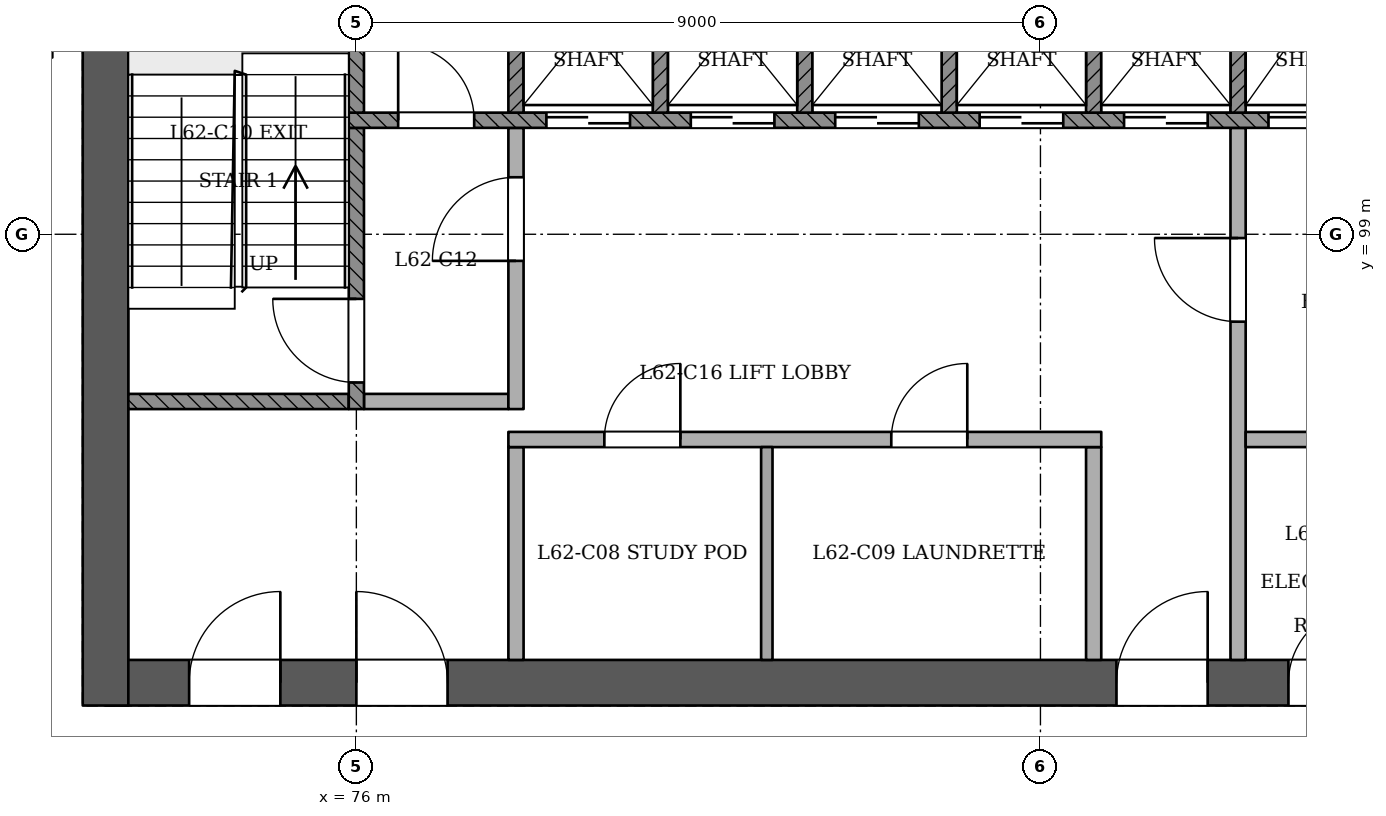
"""IFC4 building model, lengths in metres.
Left out: names, types, materials, properties, quantities, classifications, styles, units other than length and angle.
Written with IfcOpenShell. Run it as: python <this file> out.ifc"""

import sys

from ifc_helpers import new_model, si_unit, direction, frame, frame_2d, origin, place, context, subcontext, project, spatial, rectangle, extrude, element, fill, save


model = new_model("IFC4")
c1 = context("Model", 3, precision=1e-05, world=origin(), true_north=direction((0.0, 1.0)))
c2 = subcontext(c1, "Body", "Model", "MODEL_VIEW")
j1 = project(units=[si_unit("LENGTHUNIT", "METRE"), si_unit("PLANEANGLEUNIT", "RADIAN")], contexts=[c1])
p1 = place(None, origin())
s1 = spatial("IfcSite", under=j1, at=p1, CompositionType="ELEMENT")
p2 = place(p1, origin())
s2 = spatial("IfcBuilding", under=s1, at=p2, CompositionType="ELEMENT")
p3 = place(p2, frame((0.0, 0.0, 242.8)))
s3 = spatial("IfcBuildingStorey", under=s2, at=p3, CompositionType="ELEMENT", Elevation=242.8)
p4 = place(p3, frame((72.7, 93.1, 0.0), z_axis=(0.0, 0.0, 1.0), x_axis=(1.0, 0.0, 0.0)))
e1 = element("IfcWall", 1, at=p4, inside=s3, PredefinedType="SHEAR", context=c2, shape_type="SweptSolid", body=[
    extrude(rectangle(XDim=24.9, YDim=0.6, at=frame_2d((12.45, 0.0))), origin(), (0.0, 0.0, 1.0), 3.6),
])
p5 = place(p4, frame((1.1, 0.0, 0.0)))
e2 = element("IfcOpeningElement", 2, at=p5, cuts=e1, PredefinedType="OPENING", context=c2, shape_type="SweptSolid", body=[
    extrude(rectangle(XDim=1.2, YDim=2.1, at=frame_2d((0.6, 1.05))), frame((0.0, 0.311, 0.0), z_axis=(0.0, -1.0, 0.0), x_axis=(1.0, 0.0, 0.0)), (0.0, 0.0, 1.0), 0.621),
])
p6 = place(p4, frame((3.3, 0.0, 0.0)))
e3 = element("IfcOpeningElement", 3, at=p6, cuts=e1, PredefinedType="OPENING", context=c2, shape_type="SweptSolid", body=[
    extrude(rectangle(XDim=1.2, YDim=2.1, at=frame_2d((0.6, 1.05))), frame((0.0, 0.311, 0.0), z_axis=(0.0, -1.0, 0.0), x_axis=(1.0, 0.0, 0.0)), (0.0, 0.0, 1.0), 0.621),
])
p7 = place(p4, frame((13.3, 0.0, 0.0)))
e4 = element("IfcOpeningElement", 4, at=p7, cuts=e1, PredefinedType="OPENING", context=c2, shape_type="SweptSolid", body=[
    extrude(rectangle(XDim=1.2, YDim=2.1, at=frame_2d((0.6, 1.05))), frame((0.0, 0.311, 0.0), z_axis=(0.0, -1.0, 0.0), x_axis=(1.0, 0.0, 0.0)), (0.0, 0.0, 1.0), 0.621),
])
p8 = place(p4, frame((15.562, 0.0, 0.0)))
e5 = element("IfcOpeningElement", 5, at=p8, cuts=e1, PredefinedType="OPENING", context=c2, shape_type="SweptSolid", body=[
    extrude(rectangle(XDim=1.0, YDim=2.1, at=frame_2d((0.5, 1.05))), frame((0.0, 0.311, 0.0), z_axis=(0.0, -1.0, 0.0), x_axis=(1.0, 0.0, 0.0)), (0.0, 0.0, 1.0), 0.621),
])
p9 = place(p4, frame((18.2, 0.0, 0.0)))
e6 = element("IfcOpeningElement", 6, at=p9, cuts=e1, PredefinedType="OPENING", context=c2, shape_type="SweptSolid", body=[
    extrude(rectangle(XDim=1.0, YDim=2.1, at=frame_2d((0.5, 1.05))), frame((0.0, 0.311, 0.0), z_axis=(0.0, -1.0, 0.0), x_axis=(1.0, 0.0, 0.0)), (0.0, 0.0, 1.0), 0.621),
])
p10 = place(p4, frame((21.788, 0.0, 0.0)))
e7 = element("IfcOpeningElement", 7, at=p10, cuts=e1, PredefinedType="OPENING", context=c2, shape_type="SweptSolid", body=[
    extrude(rectangle(XDim=1.0, YDim=2.1, at=frame_2d((0.5, 1.05))), frame((0.0, 0.311, 0.0), z_axis=(0.0, -1.0, 0.0), x_axis=(1.0, 0.0, 0.0)), (0.0, 0.0, 1.0), 0.621),
])
p11 = place(p3, frame((72.7, 103.7, 0.0), z_axis=(0.0, 0.0, 1.0), x_axis=(0.0, -1.0, 0.0)))
e8 = element("IfcWall", 8, at=p11, inside=s3, PredefinedType="SHEAR", context=c2, shape_type="SweptSolid", body=[
    extrude(rectangle(XDim=10.9, YDim=0.6, at=frame_2d((5.45, 0.0))), origin(), (0.0, 0.0, 1.0), 3.6),
])
p12 = place(p3, frame((72.0, 101.4, 0.0), z_axis=(0.0, 0.0, 1.0), x_axis=(-1.0, 0.0, 0.0)))
e9 = element("IfcWall", 9, at=p12, inside=s3, PredefinedType="PARTITIONING", context=c2, shape_type="SweptSolid", body=[
    extrude(rectangle(XDim=1.8, YDim=0.15, at=frame_2d((0.9, 0.0))), origin(), (0.0, 0.0, 1.0), 3.2),
])
p13 = place(p12, frame((0.566, 0.0, 0.0)))
e10 = element("IfcOpeningElement", 10, at=p13, cuts=e9, PredefinedType="OPENING", context=c2, shape_type="SweptSolid", body=[
    extrude(rectangle(XDim=1.0, YDim=2.1, at=frame_2d((0.5, 1.05))), frame((0.0, 0.085, 0.0), z_axis=(0.0, -1.0, 0.0), x_axis=(1.0, 0.0, 0.0)), (0.0, 0.0, 1.0), 0.171),
])
p14 = place(p3, frame((78.1, 93.4, 0.0), z_axis=(0.0, 0.0, 1.0), x_axis=(0.0, 1.0, 0.0)))
e11 = element("IfcWall", 11, at=p14, inside=s3, PredefinedType="PARTITIONING", context=c2, shape_type="SweptSolid", body=[
    extrude(rectangle(XDim=2.8, YDim=0.2, at=frame_2d((1.4, 0.0))), origin(), (0.0, 0.0, 1.0), 3.2),
])
p15 = place(p3, frame((81.4, 93.4, 0.0), z_axis=(0.0, 0.0, 1.0), x_axis=(0.0, 1.0, 0.0)))
e12 = element("IfcWall", 12, at=p15, inside=s3, PredefinedType="PARTITIONING", context=c2, shape_type="SweptSolid", body=[
    extrude(rectangle(XDim=2.8, YDim=0.15, at=frame_2d((1.4, 0.0))), origin(), (0.0, 0.0, 1.0), 3.2),
])
p16 = place(p3, frame((85.7, 93.4, 0.0), z_axis=(0.0, 0.0, 1.0), x_axis=(0.0, 1.0, 0.0)))
e13 = element("IfcWall", 13, at=p16, inside=s3, PredefinedType="PARTITIONING", context=c2, shape_type="SweptSolid", body=[
    extrude(rectangle(XDim=2.8, YDim=0.2, at=frame_2d((1.4, 0.0))), origin(), (0.0, 0.0, 1.0), 3.2),
])
p17 = place(p3, frame((87.6, 93.4, 0.0), z_axis=(0.0, 0.0, 1.0), x_axis=(0.0, 1.0, 0.0)))
e14 = element("IfcWall", 14, at=p17, inside=s3, PredefinedType="PARTITIONING", context=c2, shape_type="SweptSolid", body=[
    extrude(rectangle(XDim=7.0, YDim=0.2, at=frame_2d((3.5, 0.0))), origin(), (0.0, 0.0, 1.0), 3.2),
])
p18 = place(p17, frame((4.45, 0.0, 0.0)))
e15 = element("IfcOpeningElement", 15, at=p18, cuts=e14, PredefinedType="OPENING", context=c2, shape_type="SweptSolid", body=[
    extrude(rectangle(XDim=1.1, YDim=2.1, at=frame_2d((0.55, 1.05))), frame((0.0, 0.11, 0.0), z_axis=(0.0, -1.0, 0.0), x_axis=(1.0, 0.0, 0.0)), (0.0, 0.0, 1.0), 0.221),
])
p19 = place(p3, frame((78.0, 96.3, 0.0), z_axis=(0.0, 0.0, 1.0), x_axis=(1.0, 0.0, 0.0)))
e16 = element("IfcWall", 16, at=p19, inside=s3, PredefinedType="PARTITIONING", context=c2, shape_type="SweptSolid", body=[
    extrude(rectangle(XDim=7.8, YDim=0.2, at=frame_2d((3.9, 0.0))), origin(), (0.0, 0.0, 1.0), 3.2),
])
p20 = place(p19, frame((1.262, 0.0, 0.0)))
e17 = element("IfcOpeningElement", 17, at=p20, cuts=e16, PredefinedType="OPENING", context=c2, shape_type="SweptSolid", body=[
    extrude(rectangle(XDim=1.0, YDim=2.1, at=frame_2d((0.5, 1.05))), frame((0.0, 0.11, 0.0), z_axis=(0.0, -1.0, 0.0), x_axis=(1.0, 0.0, 0.0)), (0.0, 0.0, 1.0), 0.221),
])
p21 = place(p19, frame((5.038, 0.0, 0.0)))
e18 = element("IfcOpeningElement", 18, at=p21, cuts=e16, PredefinedType="OPENING", context=c2, shape_type="SweptSolid", body=[
    extrude(rectangle(XDim=1.0, YDim=2.1, at=frame_2d((0.5, 1.05))), frame((0.0, 0.11, 0.0), z_axis=(0.0, -1.0, 0.0), x_axis=(1.0, 0.0, 0.0)), (0.0, 0.0, 1.0), 0.221),
])
p22 = place(p3, frame((87.7, 96.3, 0.0), z_axis=(0.0, 0.0, 1.0), x_axis=(1.0, 0.0, 0.0)))
e19 = element("IfcWall", 19, at=p22, inside=s3, PredefinedType="PARTITIONING", context=c2, shape_type="SweptSolid", body=[
    extrude(rectangle(XDim=3.6, YDim=0.2, at=frame_2d((1.8, 0.0))), origin(), (0.0, 0.0, 1.0), 3.2),
])
p23 = place(p3, frame((73.0, 96.8, 0.0), z_axis=(0.0, 0.0, 1.0), x_axis=(1.0, 0.0, 0.0)))
e20 = element("IfcWall", 20, at=p23, inside=s3, PredefinedType="SOLIDWALL", context=c2, shape_type="SweptSolid", body=[
    extrude(rectangle(XDim=2.9, YDim=0.2, at=frame_2d((1.45, 0.0))), origin(), (0.0, 0.0, 1.0), 3.2),
])
p24 = place(p3, frame((76.0, 96.7, 0.0), z_axis=(0.0, 0.0, 1.0), x_axis=(0.0, 1.0, 0.0)))
e21 = element("IfcWall", 21, at=p24, inside=s3, PredefinedType="SOLIDWALL", context=c2, shape_type="SweptSolid", body=[
    extrude(rectangle(XDim=3.7, YDim=0.2, at=frame_2d((1.85, 0.0))), origin(), (0.0, 0.0, 1.0), 3.2),
])
p25 = place(p24, frame((0.35, 0.0, 0.0)))
e22 = element("IfcOpeningElement", 22, at=p25, cuts=e21, PredefinedType="OPENING", context=c2, shape_type="SweptSolid", body=[
    extrude(rectangle(XDim=1.1, YDim=2.1, at=frame_2d((0.55, 1.05))), frame((0.0, 0.11, 0.0), z_axis=(0.0, -1.0, 0.0), x_axis=(1.0, 0.0, 0.0)), (0.0, 0.0, 1.0), 0.221),
])
p26 = place(p3, frame((76.1, 96.8, 0.0), z_axis=(0.0, 0.0, 1.0), x_axis=(1.0, 0.0, 0.0)))
e23 = element("IfcWall", 23, at=p26, inside=s3, PredefinedType="PARTITIONING", context=c2, shape_type="SweptSolid", body=[
    extrude(rectangle(XDim=1.9, YDim=0.2, at=frame_2d((0.95, 0.0))), origin(), (0.0, 0.0, 1.0), 3.2),
])
p27 = place(p3, frame((78.1, 96.7, 0.0), z_axis=(0.0, 0.0, 1.0), x_axis=(0.0, 1.0, 0.0)))
e24 = element("IfcWall", 24, at=p27, inside=s3, PredefinedType="PARTITIONING", context=c2, shape_type="SweptSolid", body=[
    extrude(rectangle(XDim=3.7, YDim=0.2, at=frame_2d((1.85, 0.0))), origin(), (0.0, 0.0, 1.0), 3.2),
])
p28 = place(p27, frame((1.95, 0.0, 0.0)))
e25 = element("IfcOpeningElement", 25, at=p28, cuts=e24, PredefinedType="OPENING", context=c2, shape_type="SweptSolid", body=[
    extrude(rectangle(XDim=1.1, YDim=2.1, at=frame_2d((0.55, 1.05))), frame((0.0, 0.11, 0.0), z_axis=(0.0, -1.0, 0.0), x_axis=(1.0, 0.0, 0.0)), (0.0, 0.0, 1.0), 0.221),
])
p29 = place(p3, frame((75.9, 100.5, 0.0), z_axis=(0.0, 0.0, 1.0), x_axis=(1.0, 0.0, 0.0)))
e26 = element("IfcWall", 26, at=p29, inside=s3, PredefinedType="SOLIDWALL", context=c2, shape_type="SweptSolid", body=[
    extrude(rectangle(XDim=18.2, YDim=0.2, at=frame_2d((9.1, 0.0))), origin(), (0.0, 0.0, 1.0), 3.2),
])
p30 = place(p29, frame((2.6, 0.0, 0.0)))
e27 = element("IfcOpeningElement", 27, at=p30, cuts=e26, PredefinedType="OPENING", context=c2, shape_type="SweptSolid", body=[
    extrude(rectangle(XDim=1.1, YDim=2.1, at=frame_2d((0.55, 1.05))), frame((0.0, 0.11, 0.0), z_axis=(0.0, -1.0, 0.0), x_axis=(1.0, 0.0, 0.0)), (0.0, 0.0, 1.0), 0.221),
])
p31 = place(p29, frame((4.5, 0.0, 0.0)))
e28 = element("IfcOpeningElement", 28, at=p31, cuts=e26, PredefinedType="OPENING", context=c2, shape_type="SweptSolid", body=[
    extrude(rectangle(XDim=1.1, YDim=2.1, at=frame_2d((0.55, 1.05))), frame((0.0, 0.11, 0.0), z_axis=(0.0, -1.0, 0.0), x_axis=(1.0, 0.0, 0.0)), (0.0, 0.0, 1.0), 0.221),
])
p32 = place(p29, frame((6.4, 0.0, 0.0)))
e29 = element("IfcOpeningElement", 29, at=p32, cuts=e26, PredefinedType="OPENING", context=c2, shape_type="SweptSolid", body=[
    extrude(rectangle(XDim=1.1, YDim=2.1, at=frame_2d((0.55, 1.05))), frame((0.0, 0.11, 0.0), z_axis=(0.0, -1.0, 0.0), x_axis=(1.0, 0.0, 0.0)), (0.0, 0.0, 1.0), 0.221),
])
p33 = place(p29, frame((8.3, 0.0, 0.0)))
e30 = element("IfcOpeningElement", 30, at=p33, cuts=e26, PredefinedType="OPENING", context=c2, shape_type="SweptSolid", body=[
    extrude(rectangle(XDim=1.1, YDim=2.1, at=frame_2d((0.55, 1.05))), frame((0.0, 0.11, 0.0), z_axis=(0.0, -1.0, 0.0), x_axis=(1.0, 0.0, 0.0)), (0.0, 0.0, 1.0), 0.221),
])
p34 = place(p29, frame((10.2, 0.0, 0.0)))
e31 = element("IfcOpeningElement", 31, at=p34, cuts=e26, PredefinedType="OPENING", context=c2, shape_type="SweptSolid", body=[
    extrude(rectangle(XDim=1.1, YDim=2.1, at=frame_2d((0.55, 1.05))), frame((0.0, 0.11, 0.0), z_axis=(0.0, -1.0, 0.0), x_axis=(1.0, 0.0, 0.0)), (0.0, 0.0, 1.0), 0.221),
])
p35 = place(p29, frame((12.1, 0.0, 0.0)))
e32 = element("IfcOpeningElement", 32, at=p35, cuts=e26, PredefinedType="OPENING", context=c2, shape_type="SweptSolid", body=[
    extrude(rectangle(XDim=1.1, YDim=2.1, at=frame_2d((0.55, 1.05))), frame((0.0, 0.11, 0.0), z_axis=(0.0, -1.0, 0.0), x_axis=(1.0, 0.0, 0.0)), (0.0, 0.0, 1.0), 0.221),
])
p36 = place(p29, frame((14.0, 0.0, 0.0)))
e33 = element("IfcOpeningElement", 33, at=p36, cuts=e26, PredefinedType="OPENING", context=c2, shape_type="SweptSolid", body=[
    extrude(rectangle(XDim=1.1, YDim=2.1, at=frame_2d((0.55, 1.05))), frame((0.0, 0.11, 0.0), z_axis=(0.0, -1.0, 0.0), x_axis=(1.0, 0.0, 0.0)), (0.0, 0.0, 1.0), 0.221),
])
p37 = place(p29, frame((0.65, 0.0, 0.0)))
e34 = element("IfcOpeningElement", 34, at=p37, cuts=e26, PredefinedType="OPENING", context=c2, shape_type="SweptSolid", body=[
    extrude(rectangle(XDim=1.0, YDim=2.1, at=frame_2d((0.5, 1.05))), frame((0.0, 0.11, 0.0), z_axis=(0.0, -1.0, 0.0), x_axis=(1.0, 0.0, 0.0)), (0.0, 0.0, 1.0), 0.221),
])
p38 = place(p29, frame((16.3, 0.0, 0.0)))
e35 = element("IfcOpeningElement", 35, at=p38, cuts=e26, PredefinedType="OPENING", context=c2, shape_type="SweptSolid", body=[
    extrude(rectangle(XDim=1.0, YDim=2.1, at=frame_2d((0.5, 1.05))), frame((0.0, 0.11, 0.0), z_axis=(0.0, -1.0, 0.0), x_axis=(1.0, 0.0, 0.0)), (0.0, 0.0, 1.0), 0.221),
])
for number, where, z_axis, x_axis in (
    (36, (76.0, 100.6, 0.0), (0.0, 0.0, 1.0), (0.0, 1.0, 0.0)),
    (37, (78.1, 100.6, 0.0), (0.0, 0.0, 1.0), (0.0, 1.0, 0.0)),
    (38, (80.0, 100.6, 0.0), (0.0, 0.0, 1.0), (0.0, 1.0, 0.0)),
    (39, (81.9, 100.6, 0.0), (0.0, 0.0, 1.0), (0.0, 1.0, 0.0)),
    (40, (83.8, 100.6, 0.0), (0.0, 0.0, 1.0), (0.0, 1.0, 0.0)),
    (41, (85.7, 100.6, 0.0), (0.0, 0.0, 1.0), (0.0, 1.0, 0.0)),
    (42, (87.6, 100.6, 0.0), (0.0, 0.0, 1.0), (0.0, 1.0, 0.0)),
):
    element("IfcWall", number, at=place(p3, frame(where, z_axis=z_axis, x_axis=x_axis)), inside=s3, PredefinedType="SOLIDWALL", context=c2, shape_type="SweptSolid", body=[
        extrude(rectangle(XDim=2.8, YDim=0.2, at=frame_2d((1.4, 0.0))), origin(), (0.0, 0.0, 1.0), 3.2),
    ])
p39 = place(p30, origin())
e43 = element("IfcDoor", 43, at=p39, inside=s3, OperationType="SLIDING_TO_RIGHT", PredefinedType="NOTDEFINED", context=c2, shape_type="SweptSolid", body=[
    extrude(rectangle(XDim=1.1, YDim=2.1, at=frame_2d((0.55, 1.05))), frame((0.0, 0.025, 0.0), z_axis=(0.0, -1.0, 0.0), x_axis=(1.0, 0.0, 0.0)), (0.0, 0.0, 1.0), 0.05),
])
fill(e27, e43)
p40 = place(p31, origin())
e44 = element("IfcDoor", 44, at=p40, inside=s3, OperationType="SLIDING_TO_LEFT", PredefinedType="NOTDEFINED", context=c2, shape_type="SweptSolid", body=[
    extrude(rectangle(XDim=1.1, YDim=2.1, at=frame_2d((0.55, 1.05))), frame((0.0, 0.025, 0.0), z_axis=(0.0, -1.0, 0.0), x_axis=(1.0, 0.0, 0.0)), (0.0, 0.0, 1.0), 0.05),
])
fill(e28, e44)
p41 = place(p32, origin())
e45 = element("IfcDoor", 45, at=p41, inside=s3, OperationType="SLIDING_TO_RIGHT", PredefinedType="NOTDEFINED", context=c2, shape_type="SweptSolid", body=[
    extrude(rectangle(XDim=1.1, YDim=2.1, at=frame_2d((0.55, 1.05))), frame((0.0, 0.025, 0.0), z_axis=(0.0, -1.0, 0.0), x_axis=(1.0, 0.0, 0.0)), (0.0, 0.0, 1.0), 0.05),
])
fill(e29, e45)
p42 = place(p33, origin())
e46 = element("IfcDoor", 46, at=p42, inside=s3, OperationType="SLIDING_TO_LEFT", PredefinedType="NOTDEFINED", context=c2, shape_type="SweptSolid", body=[
    extrude(rectangle(XDim=1.1, YDim=2.1, at=frame_2d((0.55, 1.05))), frame((0.0, 0.025, 0.0), z_axis=(0.0, -1.0, 0.0), x_axis=(1.0, 0.0, 0.0)), (0.0, 0.0, 1.0), 0.05),
])
fill(e30, e46)
p43 = place(p34, origin())
e47 = element("IfcDoor", 47, at=p43, inside=s3, OperationType="SLIDING_TO_RIGHT", PredefinedType="NOTDEFINED", context=c2, shape_type="SweptSolid", body=[
    extrude(rectangle(XDim=1.1, YDim=2.1, at=frame_2d((0.55, 1.05))), frame((0.0, 0.025, 0.0), z_axis=(0.0, -1.0, 0.0), x_axis=(1.0, 0.0, 0.0)), (0.0, 0.0, 1.0), 0.05),
])
fill(e31, e47)
p44 = place(p35, origin())
e48 = element("IfcDoor", 48, at=p44, inside=s3, OperationType="SLIDING_TO_RIGHT", PredefinedType="NOTDEFINED", context=c2, shape_type="SweptSolid", body=[
    extrude(rectangle(XDim=1.1, YDim=2.1, at=frame_2d((0.55, 1.05))), frame((0.0, 0.025, 0.0), z_axis=(0.0, -1.0, 0.0), x_axis=(1.0, 0.0, 0.0)), (0.0, 0.0, 1.0), 0.05),
])
fill(e32, e48)
p45 = place(p25, origin())
e49 = element("IfcDoor", 49, at=p45, inside=s3, OperationType="SINGLE_SWING_RIGHT", PredefinedType="NOTDEFINED", context=c2, shape_type="SweptSolid", body=[
    extrude(rectangle(XDim=1.1, YDim=2.1, at=frame_2d((0.55, 1.05))), frame((0.0, 0.025, 0.0), z_axis=(0.0, -1.0, 0.0), x_axis=(1.0, 0.0, 0.0)), (0.0, 0.0, 1.0), 0.05),
])
fill(e22, e49)
p46 = place(p28, origin())
e50 = element("IfcDoor", 50, at=p46, inside=s3, OperationType="SINGLE_SWING_LEFT", PredefinedType="NOTDEFINED", context=c2, shape_type="SweptSolid", body=[
    extrude(rectangle(XDim=1.1, YDim=2.1, at=frame_2d((0.55, 1.05))), frame((0.0, 0.025, 0.0), z_axis=(0.0, -1.0, 0.0), x_axis=(1.0, 0.0, 0.0)), (0.0, 0.0, 1.0), 0.05),
])
fill(e25, e50)
p47 = place(p18, origin())
e51 = element("IfcDoor", 51, at=p47, inside=s3, OperationType="SINGLE_SWING_RIGHT", PredefinedType="NOTDEFINED", context=c2, shape_type="SweptSolid", body=[
    extrude(rectangle(XDim=1.1, YDim=2.1, at=frame_2d((0.55, 1.05))), frame((0.0, 0.025, 0.0), z_axis=(0.0, -1.0, 0.0), x_axis=(1.0, 0.0, 0.0)), (0.0, 0.0, 1.0), 0.05),
])
fill(e15, e51)
p48 = place(p5, origin())
e52 = element("IfcDoor", 52, at=p48, inside=s3, OperationType="SINGLE_SWING_RIGHT", PredefinedType="NOTDEFINED", context=c2, shape_type="SweptSolid", body=[
    extrude(rectangle(XDim=1.2, YDim=2.1, at=frame_2d((0.6, 1.05))), frame((0.0, 0.025, 0.0), z_axis=(0.0, -1.0, 0.0), x_axis=(1.0, 0.0, 0.0)), (0.0, 0.0, 1.0), 0.05),
])
fill(e2, e52)
p49 = place(p6, origin())
e53 = element("IfcDoor", 53, at=p49, inside=s3, OperationType="SINGLE_SWING_LEFT", PredefinedType="NOTDEFINED", context=c2, shape_type="SweptSolid", body=[
    extrude(rectangle(XDim=1.2, YDim=2.1, at=frame_2d((0.6, 1.05))), frame((0.0, 0.025, 0.0), z_axis=(0.0, -1.0, 0.0), x_axis=(1.0, 0.0, 0.0)), (0.0, 0.0, 1.0), 0.05),
])
fill(e3, e53)
p50 = place(p7, origin())
e54 = element("IfcDoor", 54, at=p50, inside=s3, OperationType="SINGLE_SWING_RIGHT", PredefinedType="NOTDEFINED", context=c2, shape_type="SweptSolid", body=[
    extrude(rectangle(XDim=1.2, YDim=2.1, at=frame_2d((0.6, 1.05))), frame((0.0, 0.025, 0.0), z_axis=(0.0, -1.0, 0.0), x_axis=(1.0, 0.0, 0.0)), (0.0, 0.0, 1.0), 0.05),
])
fill(e4, e54)
p51 = place(p37, origin())
e55 = element("IfcDoor", 55, at=p51, inside=s3, OperationType="SINGLE_SWING_LEFT", PredefinedType="NOTDEFINED", context=c2, shape_type="SweptSolid", body=[
    extrude(rectangle(XDim=1.0, YDim=2.1, at=frame_2d((0.5, 1.05))), frame((0.0, 0.025, 0.0), z_axis=(0.0, -1.0, 0.0), x_axis=(1.0, 0.0, 0.0)), (0.0, 0.0, 1.0), 0.05),
])
fill(e34, e55)
p52 = place(p8, origin())
e56 = element("IfcDoor", 56, at=p52, inside=s3, OperationType="SINGLE_SWING_RIGHT", PredefinedType="NOTDEFINED", context=c2, shape_type="SweptSolid", body=[
    extrude(rectangle(XDim=1.0, YDim=2.1, at=frame_2d((0.5, 1.05))), frame((0.0, 0.025, 0.0), z_axis=(0.0, -1.0, 0.0), x_axis=(1.0, 0.0, 0.0)), (0.0, 0.0, 1.0), 0.05),
])
fill(e5, e56)
p53 = place(p20, origin())
e57 = element("IfcDoor", 57, at=p53, inside=s3, OperationType="SINGLE_SWING_RIGHT", PredefinedType="NOTDEFINED", context=c2, shape_type="SweptSolid", body=[
    extrude(rectangle(XDim=1.0, YDim=2.1, at=frame_2d((0.5, 1.05))), frame((0.0, 0.025, 0.0), z_axis=(0.0, -1.0, 0.0), x_axis=(1.0, 0.0, 0.0)), (0.0, 0.0, 1.0), 0.05),
])
fill(e17, e57)
p54 = place(p21, origin())
e58 = element("IfcDoor", 58, at=p54, inside=s3, OperationType="SINGLE_SWING_RIGHT", PredefinedType="NOTDEFINED", context=c2, shape_type="SweptSolid", body=[
    extrude(rectangle(XDim=1.0, YDim=2.1, at=frame_2d((0.5, 1.05))), frame((0.0, 0.025, 0.0), z_axis=(0.0, -1.0, 0.0), x_axis=(1.0, 0.0, 0.0)), (0.0, 0.0, 1.0), 0.05),
])
fill(e18, e58)
save(model, sys.argv[1])
